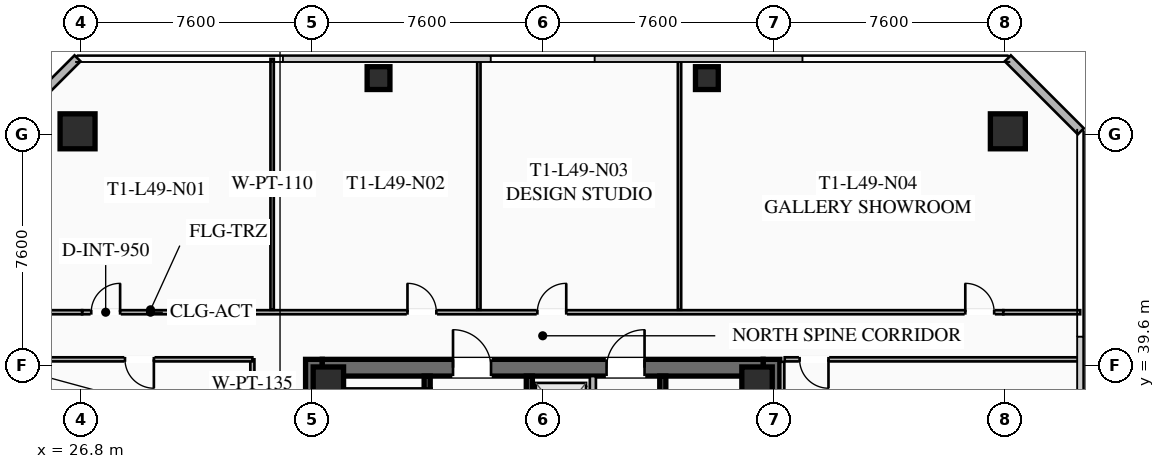
"""IFC4 building model, lengths in metres.
Left out: names, types, materials, properties, quantities, classifications, styles, units other than length and angle.
Written with IfcOpenShell. Run it as: python <this file> out.ifc"""

import sys

from ifc_helpers import new_model, si_unit, direction, frame, frame_2d, origin, origin_2d, place, context, subcontext, project, spatial, rectangle, hollow_rectangle, extrude, element, fill, save


model = new_model("IFC4")
c1 = context("Model", 3, precision=1e-05, world=origin(), true_north=direction((0.0, 1.0)))
c2 = subcontext(c1, "Body", "Model", "MODEL_VIEW")
j1 = project(units=[si_unit("LENGTHUNIT", "METRE"), si_unit("PLANEANGLEUNIT", "RADIAN")], contexts=[c1])
p1 = place(None, origin())
s1 = spatial("IfcSite", under=j1, at=p1, CompositionType="ELEMENT")
p2 = place(p1, origin())
s2 = spatial("IfcBuilding", under=s1, at=p2, CompositionType="ELEMENT")
p3 = place(p2, frame((0.0, 0.0, 181.85)))
s3 = spatial("IfcBuildingStorey", under=s2, at=p3, CompositionType="ELEMENT", Elevation=181.85)
for number, where, z_axis, x_axis in (
    (1, (34.475, 24.2, 0.0), (0.0, 0.0, 1.0), (0.0, 1.0, 0.0)),
    (2, (49.525, 39.8, 0.0), (0.0, 0.0, 1.0), (0.0, -1.0, 0.0)),
):
    element("IfcWall", number, at=place(p3, frame(where, z_axis=z_axis, x_axis=x_axis)), inside=s3, PredefinedType="SHEAR", context=c2, shape_type="SweptSolid", body=[
        extrude(rectangle(XDim=15.6, YDim=0.55, at=frame_2d((7.8, 0.0))), origin(), (0.0, 0.0, 1.0), 3.55),
    ])
p4 = place(p3, frame((34.75, 39.525, 0.0), z_axis=(0.0, 0.0, 1.0), x_axis=(1.0, 0.0, 0.0)))
e3 = element("IfcWall", 3, at=p4, inside=s3, PredefinedType="SHEAR", context=c2, shape_type="SweptSolid", body=[
    extrude(rectangle(XDim=14.5, YDim=0.55, at=frame_2d((7.25, 0.0))), origin(), (0.0, 0.0, 1.0), 3.55),
])
p5 = place(p4, frame((4.3, 0.0, 0.0)))
e4 = element("IfcOpeningElement", 4, at=p5, cuts=e3, PredefinedType="OPENING", context=c2, shape_type="SweptSolid", body=[
    extrude(rectangle(XDim=1.25, YDim=2.25, at=frame_2d((0.625, 1.125))), frame((0.0, 0.285, 0.0), z_axis=(0.0, -1.0, 0.0), x_axis=(1.0, 0.0, 0.0)), (0.0, 0.0, 1.0), 0.57),
])
p6 = place(p4, frame((9.35, 0.0, 0.0)))
e5 = element("IfcOpeningElement", 5, at=p6, cuts=e3, PredefinedType="OPENING", context=c2, shape_type="SweptSolid", body=[
    extrude(rectangle(XDim=1.25, YDim=2.25, at=frame_2d((0.625, 1.125))), frame((0.0, 0.285, 0.0), z_axis=(0.0, -1.0, 0.0), x_axis=(1.0, 0.0, 0.0)), (0.0, 0.0, 1.0), 0.57),
])
for number, where, z_axis, x_axis in (
    (6, (49.05, 39.05, 0.0), (0.0, 0.0, 1.0), (1.0, 0.0, 0.0)),
    (7, (34.95, 39.05, 0.0), (0.0, 0.0, 1.0), (1.0, 0.0, 0.0)),
):
    element("IfcColumn", number, at=place(p3, frame(where, z_axis=z_axis, x_axis=x_axis)), inside=s3, PredefinedType="COLUMN", context=c2, shape_type="SweptSolid", body=[
        extrude(hollow_rectangle(XDim=1.0, YDim=1.0, WallThickness=0.04, at=origin_2d()), origin(), (0.0, 0.0, 1.0), 3.37),
    ])
for number, where, z_axis, x_axis in (
    (8, (57.3, 47.3, 0.0), (0.0, 0.0, 1.0), (1.0, 0.0, 0.0)),
    (9, (26.7, 47.3, 0.0), (0.0, 0.0, 1.0), (1.0, 0.0, 0.0)),
):
    element("IfcColumn", number, at=place(p3, frame(where, z_axis=z_axis, x_axis=x_axis)), inside=s3, PredefinedType="COLUMN", context=c2, shape_type="SweptSolid", body=[
        extrude(hollow_rectangle(XDim=1.15, YDim=1.15, WallThickness=0.045, at=origin_2d()), origin(), (0.0, 0.0, 1.0), 3.37),
    ])
for number, where, z_axis, x_axis in (
    (10, (47.4, 49.05, 0.0), (0.0, 0.0, 1.0), (1.0, 0.0, 0.0)),
    (11, (36.6, 49.05, 0.0), (0.0, 0.0, 1.0), (1.0, 0.0, 0.0)),
):
    element("IfcColumn", number, at=place(p3, frame(where, z_axis=z_axis, x_axis=x_axis)), inside=s3, PredefinedType="COLUMN", context=c2, shape_type="SweptSolid", body=[
        extrude(hollow_rectangle(XDim=0.75, YDim=0.75, WallThickness=0.032, at=origin_2d()), origin(), (0.0, 0.0, 1.0), 3.37),
    ])
for number, where, z_axis, x_axis in (
    (12, (24.3, 47.3, 0.0), (0.0, 0.0, 1.0), (0.707, 0.707, 0.0)),
    (13, (57.3, 49.7, 0.0), (0.0, 0.0, 1.0), (0.707, -0.707, 0.0)),
):
    element("IfcWall", number, at=place(p3, frame(where, z_axis=z_axis, x_axis=x_axis)), inside=s3, PredefinedType="SOLIDWALL", context=c2, shape_type="SweptSolid", body=[
        extrude(rectangle(XDim=3.394, YDim=0.28, at=frame_2d((1.697, 0.0))), origin(), (0.0, 0.0, 1.0), 3.37),
    ])
p7 = place(p3, frame((38.2, 31.2, 0.0), z_axis=(0.0, 0.0, 1.0), x_axis=(0.0, 1.0, 0.0)))
e14 = element("IfcWall", 14, at=p7, inside=s3, PredefinedType="SHEAR", context=c2, shape_type="SweptSolid", body=[
    extrude(rectangle(XDim=8.05, YDim=0.2, at=frame_2d((4.025, 0.0))), origin(), (0.0, 0.0, 1.0), 3.37),
])
p8 = place(p7, frame((0.45, 0.0, 0.0)))
e15 = element("IfcOpeningElement", 15, at=p8, cuts=e14, PredefinedType="OPENING", context=c2, shape_type="SweptSolid", body=[
    extrude(rectangle(XDim=1.15, YDim=2.2, at=frame_2d((0.575, 1.1))), frame((0.0, 0.11, 0.0), z_axis=(0.0, -1.0, 0.0), x_axis=(1.0, 0.0, 0.0)), (0.0, 0.0, 1.0), 0.22),
])
p9 = place(p3, frame((41.56, 24.75, 0.0), z_axis=(0.0, 0.0, 1.0), x_axis=(0.0, 1.0, 0.0)))
e16 = element("IfcWall", 16, at=p9, inside=s3, PredefinedType="SHEAR", context=c2, shape_type="SweptSolid", body=[
    extrude(rectangle(XDim=14.5, YDim=0.2, at=frame_2d((7.25, 0.0))), origin(), (0.0, 0.0, 1.0), 3.37),
])
p10 = place(p3, frame((45.95, 39.25, 0.0), z_axis=(0.0, 0.0, 1.0), x_axis=(0.0, -1.0, 0.0)))
e17 = element("IfcWall", 17, at=p10, inside=s3, PredefinedType="SHEAR", context=c2, shape_type="SweptSolid", body=[
    extrude(rectangle(XDim=6.45, YDim=0.2, at=frame_2d((3.225, 0.0))), origin(), (0.0, 0.0, 1.0), 3.37),
])
p11 = place(p3, frame((43.65, 32.35, 0.0), z_axis=(0.0, 0.0, 1.0), x_axis=(0.0, 1.0, 0.0)))
e18 = element("IfcWall", 18, at=p11, inside=s3, PredefinedType="SOLIDWALL", context=c2, shape_type="SweptSolid", body=[
    extrude(rectangle(XDim=6.9, YDim=0.2, at=frame_2d((3.45, 0.0))), origin(), (0.0, 0.0, 1.0), 3.37),
])
p12 = place(p11, frame((0.575, 0.0, 0.0)))
e19 = element("IfcOpeningElement", 19, at=p12, cuts=e18, PredefinedType="OPENING", context=c2, shape_type="SweptSolid", body=[
    extrude(rectangle(XDim=1.1, YDim=2.2, at=frame_2d((0.55, 1.1))), frame((0.0, 0.11, 0.0), z_axis=(0.0, -1.0, 0.0), x_axis=(1.0, 0.0, 0.0)), (0.0, 0.0, 1.0), 0.22),
])
p13 = place(p11, frame((2.825, 0.0, 0.0)))
e20 = element("IfcOpeningElement", 20, at=p13, cuts=e18, PredefinedType="OPENING", context=c2, shape_type="SweptSolid", body=[
    extrude(rectangle(XDim=1.1, YDim=2.2, at=frame_2d((0.55, 1.1))), frame((0.0, 0.11, 0.0), z_axis=(0.0, -1.0, 0.0), x_axis=(1.0, 0.0, 0.0)), (0.0, 0.0, 1.0), 0.22),
])
p14 = place(p11, frame((5.075, 0.0, 0.0)))
e21 = element("IfcOpeningElement", 21, at=p14, cuts=e18, PredefinedType="OPENING", context=c2, shape_type="SweptSolid", body=[
    extrude(rectangle(XDim=1.1, YDim=2.2, at=frame_2d((0.55, 1.1))), frame((0.0, 0.11, 0.0), z_axis=(0.0, -1.0, 0.0), x_axis=(1.0, 0.0, 0.0)), (0.0, 0.0, 1.0), 0.22),
])
p15 = place(p3, frame((32.45, 35.4, 0.0), z_axis=(0.0, 0.0, 1.0), x_axis=(0.0, 1.0, 0.0)))
e22 = element("IfcWall", 22, at=p15, inside=s3, PredefinedType="PARTITIONING", context=c2, shape_type="SweptSolid", body=[
    extrude(rectangle(XDim=4.4, YDim=0.135, at=frame_2d((2.2, 0.0))), origin(), (0.0, 0.0, 1.0), 2.723),
])
p16 = place(p3, frame((26.85, 41.35, 0.0), z_axis=(0.0, 0.0, 1.0), x_axis=(1.0, 0.0, 0.0)))
e23 = element("IfcWall", 23, at=p16, inside=s3, PredefinedType="PARTITIONING", context=c2, shape_type="SweptSolid", body=[
    extrude(rectangle(XDim=30.3, YDim=0.135, at=frame_2d((15.15, 0.0))), origin(), (0.0, 0.0, 1.0), 2.723),
])
p17 = place(p16, frame((0.3, 0.0, 0.0)))
e24 = element("IfcOpeningElement", 24, at=p17, cuts=e23, PredefinedType="OPENING", context=c2, shape_type="SweptSolid", body=[
    extrude(rectangle(XDim=0.95, YDim=2.05, at=frame_2d((0.475, 1.025))), frame((0.0, 0.077, 0.0), z_axis=(0.0, -1.0, 0.0), x_axis=(1.0, 0.0, 0.0)), (0.0, 0.0, 1.0), 0.155),
])
p18 = place(p16, frame((10.702, 0.0, 0.0)))
e25 = element("IfcOpeningElement", 25, at=p18, cuts=e23, PredefinedType="OPENING", context=c2, shape_type="SweptSolid", body=[
    extrude(rectangle(XDim=0.95, YDim=2.05, at=frame_2d((0.475, 1.025))), frame((0.0, 0.077, 0.0), z_axis=(0.0, -1.0, 0.0), x_axis=(1.0, 0.0, 0.0)), (0.0, 0.0, 1.0), 0.155),
])
p19 = place(p16, frame((14.974, 0.0, 0.0)))
e26 = element("IfcOpeningElement", 26, at=p19, cuts=e23, PredefinedType="OPENING", context=c2, shape_type="SweptSolid", body=[
    extrude(rectangle(XDim=0.95, YDim=2.05, at=frame_2d((0.475, 1.025))), frame((0.0, 0.077, 0.0), z_axis=(0.0, -1.0, 0.0), x_axis=(1.0, 0.0, 0.0)), (0.0, 0.0, 1.0), 0.155),
])
p20 = place(p16, frame((29.05, 0.0, 0.0)))
e27 = element("IfcOpeningElement", 27, at=p20, cuts=e23, PredefinedType="OPENING", context=c2, shape_type="SweptSolid", body=[
    extrude(rectangle(XDim=0.95, YDim=2.05, at=frame_2d((0.475, 1.025))), frame((0.0, 0.077, 0.0), z_axis=(0.0, -1.0, 0.0), x_axis=(1.0, 0.0, 0.0)), (0.0, 0.0, 1.0), 0.155),
])
for number, where, z_axis, x_axis in (
    (28, (24.32, 41.35, 0.0), (0.0, 0.0, 1.0), (1.0, 0.0, 0.0)),
    (29, (57.15, 41.35, 0.0), (0.0, 0.0, 1.0), (1.0, 0.0, 0.0)),
):
    element("IfcWall", number, at=place(p3, frame(where, z_axis=z_axis, x_axis=x_axis)), inside=s3, PredefinedType="PARTITIONING", context=c2, shape_type="SweptSolid", body=[
        extrude(rectangle(XDim=2.53, YDim=0.135, at=frame_2d((1.265, 0.0))), origin(), (0.0, 0.0, 1.0), 2.723),
    ])
for number, where, z_axis, x_axis in (
    (30, (33.1, 41.43, 0.0), (0.0, 0.0, 1.0), (0.0, 1.0, 0.0)),
    (31, (39.9, 41.43, 0.0), (0.0, 0.0, 1.0), (0.0, 1.0, 0.0)),
    (32, (46.5, 41.43, 0.0), (0.0, 0.0, 1.0), (0.0, 1.0, 0.0)),
):
    element("IfcWall", number, at=place(p3, frame(where, z_axis=z_axis, x_axis=x_axis)), inside=s3, PredefinedType="PARTITIONING", context=c2, shape_type="SweptSolid", body=[
        extrude(rectangle(XDim=8.25, YDim=0.11, at=frame_2d((4.125, 0.0))), origin(), (0.0, 0.0, 1.0), 2.723),
    ])
p21 = place(p3, frame((49.88, 39.72, 0.0), z_axis=(0.0, 0.0, 1.0), x_axis=(0.0, -1.0, 0.0)))
e33 = element("IfcWall", 33, at=p21, inside=s3, PredefinedType="PARTITIONING", context=c2, shape_type="SweptSolid", body=[
    extrude(rectangle(XDim=15.44, YDim=0.135, at=frame_2d((7.72, 0.0))), origin(), (0.0, 0.0, 1.0), 2.723),
])
p22 = place(p3, frame((59.68, 39.8, 0.0), z_axis=(0.0, 0.0, 1.0), x_axis=(-1.0, 0.0, 0.0)))
e34 = element("IfcWall", 34, at=p22, inside=s3, PredefinedType="PARTITIONING", context=c2, shape_type="SweptSolid", body=[
    extrude(rectangle(XDim=9.72, YDim=0.135, at=frame_2d((4.86, 0.0))), origin(), (0.0, 0.0, 1.0), 2.723),
])
p23 = place(p22, frame((8.28, 0.0, 0.0)))
e35 = element("IfcOpeningElement", 35, at=p23, cuts=e34, PredefinedType="OPENING", context=c2, shape_type="SweptSolid", body=[
    extrude(rectangle(XDim=0.95, YDim=2.05, at=frame_2d((0.475, 1.025))), frame((0.0, 0.077, 0.0), z_axis=(0.0, -1.0, 0.0), x_axis=(1.0, 0.0, 0.0)), (0.0, 0.0, 1.0), 0.155),
])
p24 = place(p3, frame((32.45, 39.8, 0.0), z_axis=(0.0, 0.0, 1.0), x_axis=(-1.0, 0.0, 0.0)))
e36 = element("IfcWall", 36, at=p24, inside=s3, PredefinedType="PARTITIONING", context=c2, shape_type="SweptSolid", body=[
    extrude(rectangle(XDim=8.13, YDim=0.135, at=frame_2d((4.065, 0.0))), origin(), (0.0, 0.0, 1.0), 2.723),
])
p25 = place(p24, frame((3.24, 0.0, 0.0)))
e37 = element("IfcOpeningElement", 37, at=p25, cuts=e36, PredefinedType="OPENING", context=c2, shape_type="SweptSolid", body=[
    extrude(rectangle(XDim=0.95, YDim=2.05, at=frame_2d((0.475, 1.025))), frame((0.0, 0.077, 0.0), z_axis=(0.0, -1.0, 0.0), x_axis=(1.0, 0.0, 0.0)), (0.0, 0.0, 1.0), 0.155),
])
p26 = place(p5, origin())
e38 = element("IfcDoor", 38, at=p26, inside=s3, OperationType="SINGLE_SWING_LEFT", PredefinedType="DOOR", context=c2, shape_type="SweptSolid", body=[
    extrude(rectangle(XDim=1.25, YDim=2.25, at=frame_2d((0.625, 1.125))), frame((0.0, 0.025, 0.0), z_axis=(0.0, -1.0, 0.0), x_axis=(1.0, 0.0, 0.0)), (0.0, 0.0, 1.0), 0.05),
])
fill(e4, e38)
p27 = place(p6, origin())
e39 = element("IfcDoor", 39, at=p27, inside=s3, OperationType="SINGLE_SWING_RIGHT", PredefinedType="DOOR", context=c2, shape_type="SweptSolid", body=[
    extrude(rectangle(XDim=1.25, YDim=2.25, at=frame_2d((0.625, 1.125))), frame((0.0, 0.025, 0.0), z_axis=(0.0, -1.0, 0.0), x_axis=(1.0, 0.0, 0.0)), (0.0, 0.0, 1.0), 0.05),
])
fill(e5, e39)
p28 = place(p17, origin())
e40 = element("IfcDoor", 40, at=p28, inside=s3, OperationType="SINGLE_SWING_RIGHT", PredefinedType="DOOR", context=c2, shape_type="SweptSolid", body=[
    extrude(rectangle(XDim=0.95, YDim=2.05, at=frame_2d((0.475, 1.025))), frame((0.0, 0.025, 0.0), z_axis=(0.0, -1.0, 0.0), x_axis=(1.0, 0.0, 0.0)), (0.0, 0.0, 1.0), 0.05),
])
fill(e24, e40)
p29 = place(p18, origin())
e41 = element("IfcDoor", 41, at=p29, inside=s3, OperationType="SINGLE_SWING_LEFT", PredefinedType="DOOR", context=c2, shape_type="SweptSolid", body=[
    extrude(rectangle(XDim=0.95, YDim=2.05, at=frame_2d((0.475, 1.025))), frame((0.0, 0.025, 0.0), z_axis=(0.0, -1.0, 0.0), x_axis=(1.0, 0.0, 0.0)), (0.0, 0.0, 1.0), 0.05),
])
fill(e25, e41)
p30 = place(p19, origin())
e42 = element("IfcDoor", 42, at=p30, inside=s3, OperationType="SINGLE_SWING_RIGHT", PredefinedType="DOOR", context=c2, shape_type="SweptSolid", body=[
    extrude(rectangle(XDim=0.95, YDim=2.05, at=frame_2d((0.475, 1.025))), frame((0.0, 0.025, 0.0), z_axis=(0.0, -1.0, 0.0), x_axis=(1.0, 0.0, 0.0)), (0.0, 0.0, 1.0), 0.05),
])
fill(e26, e42)
p31 = place(p20, origin())
e43 = element("IfcDoor", 43, at=p31, inside=s3, OperationType="SINGLE_SWING_LEFT", PredefinedType="DOOR", context=c2, shape_type="SweptSolid", body=[
    extrude(rectangle(XDim=0.95, YDim=2.05, at=frame_2d((0.475, 1.025))), frame((0.0, 0.025, 0.0), z_axis=(0.0, -1.0, 0.0), x_axis=(1.0, 0.0, 0.0)), (0.0, 0.0, 1.0), 0.05),
])
fill(e27, e43)
p32 = place(p23, origin())
e44 = element("IfcDoor", 44, at=p32, inside=s3, OperationType="SINGLE_SWING_LEFT", PredefinedType="DOOR", context=c2, shape_type="SweptSolid", body=[
    extrude(rectangle(XDim=0.95, YDim=2.05, at=frame_2d((0.475, 1.025))), frame((0.0, 0.025, 0.0), z_axis=(0.0, -1.0, 0.0), x_axis=(1.0, 0.0, 0.0)), (0.0, 0.0, 1.0), 0.05),
])
fill(e35, e44)
p33 = place(p25, origin())
e45 = element("IfcDoor", 45, at=p33, inside=s3, OperationType="SINGLE_SWING_LEFT", PredefinedType="DOOR", context=c2, shape_type="SweptSolid", body=[
    extrude(rectangle(XDim=0.95, YDim=2.05, at=frame_2d((0.475, 1.025))), frame((0.0, 0.025, 0.0), z_axis=(0.0, -1.0, 0.0), x_axis=(1.0, 0.0, 0.0)), (0.0, 0.0, 1.0), 0.05),
])
fill(e37, e45)
save(model, sys.argv[1])
